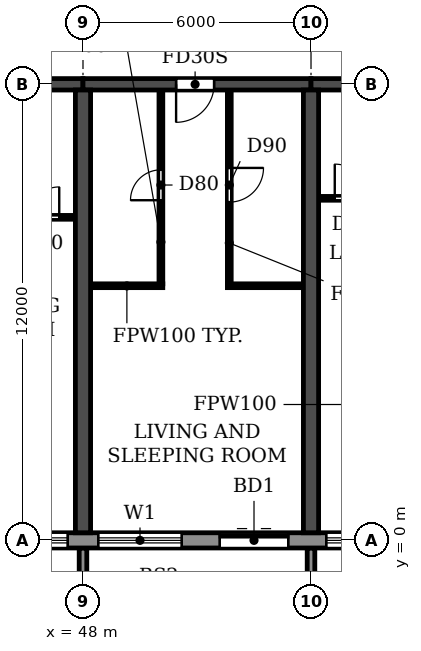
"""IFC4 building model, lengths in metres.
Left out: names, types, materials, properties, quantities, classifications, styles, units other than length and angle.
Written with IfcOpenShell. Run it as: python <this file> out.ifc"""

import sys

from ifc_helpers import new_model, si_unit, direction, frame, frame_2d, origin, place, context, subcontext, project, spatial, polyline, rectangle, outline, extrude, source, transform, mapped, element, fill, save


model = new_model("IFC4")
c1 = context("Model", 3, precision=1e-05, world=origin(), true_north=direction((0.0, 1.0)))
c2 = subcontext(c1, "Body", "Model", "MODEL_VIEW")
j1 = project(units=[si_unit("LENGTHUNIT", "METRE"), si_unit("PLANEANGLEUNIT", "RADIAN")], contexts=[c1])
p1 = place(None, origin())
s1 = spatial("IfcSite", under=j1, at=p1, CompositionType="ELEMENT")
p2 = place(p1, origin())
s2 = spatial("IfcBuilding", under=s1, at=p2, CompositionType="ELEMENT")
p3 = place(p2, frame((0.0, 0.0, 63.0)))
s3 = spatial("IfcBuildingStorey", under=s2, at=p3, CompositionType="ELEMENT", Elevation=63.0)
for number, where, z_axis, x_axis in (
    (1, (48.0, 0.2, 0.0), (0.0, 0.0, 1.0), (0.0, 1.0, 0.0)),
    (2, (54.0, 0.2, 0.0), (0.0, 0.0, 1.0), (0.0, 1.0, 0.0)),
):
    element("IfcWall", number, at=place(p3, frame(where, z_axis=z_axis, x_axis=x_axis)), inside=s3, PredefinedType="SHEAR", context=c2, shape_type="SweptSolid", body=[
        extrude(rectangle(XDim=11.65, YDim=0.4, at=frame_2d((5.825, 0.0))), origin(), (0.0, 0.0, 1.0), 2.95),
    ])
p4 = place(p3, frame((42.0, 12.0, 0.0), z_axis=(0.0, 0.0, 1.0), x_axis=(1.0, 0.0, 0.0)))
e3 = element("IfcWall", 3, at=p4, inside=s3, PredefinedType="SHEAR", context=c2, shape_type="SweptSolid", body=[
    extrude(rectangle(XDim=6.0, YDim=0.3, at=frame_2d((3.0, 0.0))), origin(), (0.0, 0.0, 1.0), 2.35),
])
p5 = place(p4, frame((2.55, 0.0, 0.0)))
e4 = element("IfcOpeningElement", 4, at=p5, cuts=e3, PredefinedType="OPENING", context=c2, shape_type="SweptSolid", body=[
    extrude(rectangle(XDim=1.0, YDim=2.1, at=frame_2d((0.5, 1.05))), frame((0.0, 0.16, 0.0), z_axis=(0.0, -1.0, 0.0), x_axis=(1.0, 0.0, 0.0)), (0.0, 0.0, 1.0), 0.32),
])
p6 = place(p3, frame((48.0, 12.0, 0.0), z_axis=(0.0, 0.0, 1.0), x_axis=(1.0, 0.0, 0.0)))
e5 = element("IfcWall", 5, at=p6, inside=s3, PredefinedType="SHEAR", context=c2, shape_type="SweptSolid", body=[
    extrude(rectangle(XDim=6.0, YDim=0.3, at=frame_2d((3.0, 0.0))), origin(), (0.0, 0.0, 1.0), 2.35),
])
p7 = place(p6, frame((2.45, 0.0, 0.0)))
e6 = element("IfcOpeningElement", 6, at=p7, cuts=e5, PredefinedType="OPENING", context=c2, shape_type="SweptSolid", body=[
    extrude(rectangle(XDim=1.0, YDim=2.1, at=frame_2d((0.5, 1.05))), frame((0.0, 0.16, 0.0), z_axis=(0.0, -1.0, 0.0), x_axis=(1.0, 0.0, 0.0)), (0.0, 0.0, 1.0), 0.32),
])
p8 = place(p3, frame((54.0, 12.0, 0.0), z_axis=(0.0, 0.0, 1.0), x_axis=(1.0, 0.0, 0.0)))
e7 = element("IfcWall", 7, at=p8, inside=s3, PredefinedType="SHEAR", context=c2, shape_type="SweptSolid", body=[
    extrude(rectangle(XDim=6.0, YDim=0.3, at=frame_2d((3.0, 0.0))), origin(), (0.0, 0.0, 1.0), 2.35),
])
p9 = place(p8, frame((2.55, 0.0, 0.0)))
e8 = element("IfcOpeningElement", 8, at=p9, cuts=e7, PredefinedType="OPENING", context=c2, shape_type="SweptSolid", body=[
    extrude(rectangle(XDim=1.0, YDim=2.1, at=frame_2d((0.5, 1.05))), frame((0.0, 0.16, 0.0), z_axis=(0.0, -1.0, 0.0), x_axis=(1.0, 0.0, 0.0)), (0.0, 0.0, 1.0), 0.32),
])
p10 = place(p3, frame((10.683, 0.0, 0.0), z_axis=(0.0, 0.0, 1.0), x_axis=(1.0, 0.0, 0.0)))
e9 = element("IfcWall", 9, at=p10, inside=s3, PredefinedType="STANDARD", context=c2, shape_type="SweptSolid", body=[
    extrude(rectangle(XDim=80.634, YDim=0.4, at=frame_2d((40.317, 0.0))), origin(), (0.0, 0.0, 1.0), 2.95),
])
p11 = place(p10, frame((1.717, 0.0, 0.9)))
e10 = element("IfcOpeningElement", 10, at=p11, cuts=e9, PredefinedType="OPENING", context=c2, shape_type="SweptSolid", body=[
    extrude(rectangle(XDim=2.2, YDim=1.5, at=frame_2d((1.1, 0.75))), frame((0.0, 0.21, 0.0), z_axis=(0.0, -1.0, 0.0), x_axis=(1.0, 0.0, 0.0)), (0.0, 0.0, 1.0), 0.42),
])
p12 = place(p10, frame((4.917, 0.0, 0.0)))
e11 = element("IfcOpeningElement", 11, at=p12, cuts=e9, PredefinedType="OPENING", context=c2, shape_type="SweptSolid", body=[
    extrude(rectangle(XDim=1.8, YDim=2.4, at=frame_2d((0.9, 1.2))), frame((0.0, 0.21, 0.0), z_axis=(0.0, -1.0, 0.0), x_axis=(1.0, 0.0, 0.0)), (0.0, 0.0, 1.0), 0.42),
])
p13 = place(p10, frame((7.717, 0.0, 0.9)))
e12 = element("IfcOpeningElement", 12, at=p13, cuts=e9, PredefinedType="OPENING", context=c2, shape_type="SweptSolid", body=[
    extrude(rectangle(XDim=2.2, YDim=1.5, at=frame_2d((1.1, 0.75))), frame((0.0, 0.21, 0.0), z_axis=(0.0, -1.0, 0.0), x_axis=(1.0, 0.0, 0.0)), (0.0, 0.0, 1.0), 0.42),
])
p14 = place(p10, frame((10.717, 0.0, 0.9)))
e13 = element("IfcOpeningElement", 13, at=p14, cuts=e9, PredefinedType="OPENING", context=c2, shape_type="SweptSolid", body=[
    extrude(rectangle(XDim=2.2, YDim=1.5, at=frame_2d((1.1, 0.75))), frame((0.0, 0.21, 0.0), z_axis=(0.0, -1.0, 0.0), x_axis=(1.0, 0.0, 0.0)), (0.0, 0.0, 1.0), 0.42),
])
p15 = place(p10, frame((13.717, 0.0, 0.9)))
e14 = element("IfcOpeningElement", 14, at=p15, cuts=e9, PredefinedType="OPENING", context=c2, shape_type="SweptSolid", body=[
    extrude(rectangle(XDim=2.2, YDim=1.5, at=frame_2d((1.1, 0.75))), frame((0.0, 0.21, 0.0), z_axis=(0.0, -1.0, 0.0), x_axis=(1.0, 0.0, 0.0)), (0.0, 0.0, 1.0), 0.42),
])
p16 = place(p10, frame((16.917, 0.0, 0.0)))
e15 = element("IfcOpeningElement", 15, at=p16, cuts=e9, PredefinedType="OPENING", context=c2, shape_type="SweptSolid", body=[
    extrude(rectangle(XDim=1.8, YDim=2.4, at=frame_2d((0.9, 1.2))), frame((0.0, 0.21, 0.0), z_axis=(0.0, -1.0, 0.0), x_axis=(1.0, 0.0, 0.0)), (0.0, 0.0, 1.0), 0.42),
])
p17 = place(p10, frame((19.717, 0.0, 0.9)))
e16 = element("IfcOpeningElement", 16, at=p17, cuts=e9, PredefinedType="OPENING", context=c2, shape_type="SweptSolid", body=[
    extrude(rectangle(XDim=2.2, YDim=1.5, at=frame_2d((1.1, 0.75))), frame((0.0, 0.21, 0.0), z_axis=(0.0, -1.0, 0.0), x_axis=(1.0, 0.0, 0.0)), (0.0, 0.0, 1.0), 0.42),
])
p18 = place(p10, frame((22.717, 0.0, 0.9)))
e17 = element("IfcOpeningElement", 17, at=p18, cuts=e9, PredefinedType="OPENING", context=c2, shape_type="SweptSolid", body=[
    extrude(rectangle(XDim=2.2, YDim=1.5, at=frame_2d((1.1, 0.75))), frame((0.0, 0.21, 0.0), z_axis=(0.0, -1.0, 0.0), x_axis=(1.0, 0.0, 0.0)), (0.0, 0.0, 1.0), 0.42),
])
p19 = place(p10, frame((25.917, 0.0, 0.0)))
e18 = element("IfcOpeningElement", 18, at=p19, cuts=e9, PredefinedType="OPENING", context=c2, shape_type="SweptSolid", body=[
    extrude(rectangle(XDim=1.8, YDim=2.4, at=frame_2d((0.9, 1.2))), frame((0.0, 0.21, 0.0), z_axis=(0.0, -1.0, 0.0), x_axis=(1.0, 0.0, 0.0)), (0.0, 0.0, 1.0), 0.42),
])
p20 = place(p10, frame((28.717, 0.0, 0.9)))
e19 = element("IfcOpeningElement", 19, at=p20, cuts=e9, PredefinedType="OPENING", context=c2, shape_type="SweptSolid", body=[
    extrude(rectangle(XDim=2.2, YDim=1.5, at=frame_2d((1.1, 0.75))), frame((0.0, 0.21, 0.0), z_axis=(0.0, -1.0, 0.0), x_axis=(1.0, 0.0, 0.0)), (0.0, 0.0, 1.0), 0.42),
])
p21 = place(p10, frame((31.717, 0.0, 0.9)))
e20 = element("IfcOpeningElement", 20, at=p21, cuts=e9, PredefinedType="OPENING", context=c2, shape_type="SweptSolid", body=[
    extrude(rectangle(XDim=2.2, YDim=1.5, at=frame_2d((1.1, 0.75))), frame((0.0, 0.21, 0.0), z_axis=(0.0, -1.0, 0.0), x_axis=(1.0, 0.0, 0.0)), (0.0, 0.0, 1.0), 0.42),
])
p22 = place(p10, frame((34.717, 0.0, 0.9)))
e21 = element("IfcOpeningElement", 21, at=p22, cuts=e9, PredefinedType="OPENING", context=c2, shape_type="SweptSolid", body=[
    extrude(rectangle(XDim=2.2, YDim=1.5, at=frame_2d((1.1, 0.75))), frame((0.0, 0.21, 0.0), z_axis=(0.0, -1.0, 0.0), x_axis=(1.0, 0.0, 0.0)), (0.0, 0.0, 1.0), 0.42),
])
p23 = place(p10, frame((37.717, 0.0, 0.9)))
e22 = element("IfcOpeningElement", 22, at=p23, cuts=e9, PredefinedType="OPENING", context=c2, shape_type="SweptSolid", body=[
    extrude(rectangle(XDim=2.2, YDim=1.5, at=frame_2d((1.1, 0.75))), frame((0.0, 0.21, 0.0), z_axis=(0.0, -1.0, 0.0), x_axis=(1.0, 0.0, 0.0)), (0.0, 0.0, 1.0), 0.42),
])
p24 = place(p10, frame((40.917, 0.0, 0.0)))
e23 = element("IfcOpeningElement", 23, at=p24, cuts=e9, PredefinedType="OPENING", context=c2, shape_type="SweptSolid", body=[
    extrude(rectangle(XDim=1.8, YDim=2.4, at=frame_2d((0.9, 1.2))), frame((0.0, 0.21, 0.0), z_axis=(0.0, -1.0, 0.0), x_axis=(1.0, 0.0, 0.0)), (0.0, 0.0, 1.0), 0.42),
])
p25 = place(p10, frame((43.717, 0.0, 0.9)))
e24 = element("IfcOpeningElement", 24, at=p25, cuts=e9, PredefinedType="OPENING", context=c2, shape_type="SweptSolid", body=[
    extrude(rectangle(XDim=2.2, YDim=1.5, at=frame_2d((1.1, 0.75))), frame((0.0, 0.21, 0.0), z_axis=(0.0, -1.0, 0.0), x_axis=(1.0, 0.0, 0.0)), (0.0, 0.0, 1.0), 0.42),
])
p26 = place(p10, frame((46.717, 0.0, 0.9)))
e25 = element("IfcOpeningElement", 25, at=p26, cuts=e9, PredefinedType="OPENING", context=c2, shape_type="SweptSolid", body=[
    extrude(rectangle(XDim=2.2, YDim=1.5, at=frame_2d((1.1, 0.75))), frame((0.0, 0.21, 0.0), z_axis=(0.0, -1.0, 0.0), x_axis=(1.0, 0.0, 0.0)), (0.0, 0.0, 1.0), 0.42),
])
p27 = place(p10, frame((49.717, 0.0, 0.9)))
e26 = element("IfcOpeningElement", 26, at=p27, cuts=e9, PredefinedType="OPENING", context=c2, shape_type="SweptSolid", body=[
    extrude(rectangle(XDim=2.2, YDim=1.5, at=frame_2d((1.1, 0.75))), frame((0.0, 0.21, 0.0), z_axis=(0.0, -1.0, 0.0), x_axis=(1.0, 0.0, 0.0)), (0.0, 0.0, 1.0), 0.42),
])
p28 = place(p10, frame((52.717, 0.0, 0.9)))
e27 = element("IfcOpeningElement", 27, at=p28, cuts=e9, PredefinedType="OPENING", context=c2, shape_type="SweptSolid", body=[
    extrude(rectangle(XDim=2.2, YDim=1.5, at=frame_2d((1.1, 0.75))), frame((0.0, 0.21, 0.0), z_axis=(0.0, -1.0, 0.0), x_axis=(1.0, 0.0, 0.0)), (0.0, 0.0, 1.0), 0.42),
])
p29 = place(p10, frame((55.717, 0.0, 0.9)))
e28 = element("IfcOpeningElement", 28, at=p29, cuts=e9, PredefinedType="OPENING", context=c2, shape_type="SweptSolid", body=[
    extrude(rectangle(XDim=2.2, YDim=1.5, at=frame_2d((1.1, 0.75))), frame((0.0, 0.21, 0.0), z_axis=(0.0, -1.0, 0.0), x_axis=(1.0, 0.0, 0.0)), (0.0, 0.0, 1.0), 0.42),
])
p30 = place(p10, frame((58.717, 0.0, 0.9)))
e29 = element("IfcOpeningElement", 29, at=p30, cuts=e9, PredefinedType="OPENING", context=c2, shape_type="SweptSolid", body=[
    extrude(rectangle(XDim=2.2, YDim=1.5, at=frame_2d((1.1, 0.75))), frame((0.0, 0.21, 0.0), z_axis=(0.0, -1.0, 0.0), x_axis=(1.0, 0.0, 0.0)), (0.0, 0.0, 1.0), 0.42),
])
p31 = place(p10, frame((61.717, 0.0, 0.9)))
e30 = element("IfcOpeningElement", 30, at=p31, cuts=e9, PredefinedType="OPENING", context=c2, shape_type="SweptSolid", body=[
    extrude(rectangle(XDim=2.2, YDim=1.5, at=frame_2d((1.1, 0.75))), frame((0.0, 0.21, 0.0), z_axis=(0.0, -1.0, 0.0), x_axis=(1.0, 0.0, 0.0)), (0.0, 0.0, 1.0), 0.42),
])
p32 = place(p10, frame((64.917, 0.0, 0.0)))
e31 = element("IfcOpeningElement", 31, at=p32, cuts=e9, PredefinedType="OPENING", context=c2, shape_type="SweptSolid", body=[
    extrude(rectangle(XDim=1.8, YDim=2.4, at=frame_2d((0.9, 1.2))), frame((0.0, 0.21, 0.0), z_axis=(0.0, -1.0, 0.0), x_axis=(1.0, 0.0, 0.0)), (0.0, 0.0, 1.0), 0.42),
])
p33 = place(p10, frame((67.717, 0.0, 0.9)))
e32 = element("IfcOpeningElement", 32, at=p33, cuts=e9, PredefinedType="OPENING", context=c2, shape_type="SweptSolid", body=[
    extrude(rectangle(XDim=2.2, YDim=1.5, at=frame_2d((1.1, 0.75))), frame((0.0, 0.21, 0.0), z_axis=(0.0, -1.0, 0.0), x_axis=(1.0, 0.0, 0.0)), (0.0, 0.0, 1.0), 0.42),
])
p34 = place(p10, frame((70.717, 0.0, 0.9)))
e33 = element("IfcOpeningElement", 33, at=p34, cuts=e9, PredefinedType="OPENING", context=c2, shape_type="SweptSolid", body=[
    extrude(rectangle(XDim=2.2, YDim=1.5, at=frame_2d((1.1, 0.75))), frame((0.0, 0.21, 0.0), z_axis=(0.0, -1.0, 0.0), x_axis=(1.0, 0.0, 0.0)), (0.0, 0.0, 1.0), 0.42),
])
p35 = place(p10, frame((73.717, 0.0, 0.9)))
e34 = element("IfcOpeningElement", 34, at=p35, cuts=e9, PredefinedType="OPENING", context=c2, shape_type="SweptSolid", body=[
    extrude(rectangle(XDim=2.2, YDim=1.5, at=frame_2d((1.1, 0.75))), frame((0.0, 0.21, 0.0), z_axis=(0.0, -1.0, 0.0), x_axis=(1.0, 0.0, 0.0)), (0.0, 0.0, 1.0), 0.42),
])
p36 = place(p10, frame((76.917, 0.0, 0.0)))
e35 = element("IfcOpeningElement", 35, at=p36, cuts=e9, PredefinedType="OPENING", context=c2, shape_type="SweptSolid", body=[
    extrude(rectangle(XDim=1.8, YDim=2.4, at=frame_2d((0.9, 1.2))), frame((0.0, 0.21, 0.0), z_axis=(0.0, -1.0, 0.0), x_axis=(1.0, 0.0, 0.0)), (0.0, 0.0, 1.0), 0.42),
])
m1 = source(origin(), c2, "Body", "SweptSolid", [
    extrude(outline(polyline([(0.0, 0.0), (0.2, 0.0), (0.2, 1.65), (0.0, 1.65), (0.0, 0.0)])), origin(), (0.0, 0.0, 1.0), 3.1),
])
for number, where in (
    (36, (47.9, -1.85, 0.0)),
    (37, (53.9, -1.85, 0.0)),
):
    element("IfcWall", number, at=place(p3, frame(where)), inside=s3, PredefinedType="STANDARD", context=c2, shape_type="MappedRepresentation", body=[
        mapped(m1, transform((0.0, 0.0, 0.0))),
    ])
p37 = place(p3, frame((48.21, 6.7, 0.0), z_axis=(0.0, 0.0, 1.0), x_axis=(1.0, 0.0, 0.0)))
e38 = element("IfcWall", 38, at=p37, inside=s3, PredefinedType="PARTITIONING", context=c2, shape_type="SweptSolid", body=[
    extrude(rectangle(XDim=1.89, YDim=0.1, at=frame_2d((0.945, 0.0))), origin(), (0.0, 0.0, 1.0), 2.95),
])
p38 = place(p3, frame((51.8, 6.7, 0.0), z_axis=(0.0, 0.0, 1.0), x_axis=(1.0, 0.0, 0.0)))
e39 = element("IfcWall", 39, at=p38, inside=s3, PredefinedType="PARTITIONING", context=c2, shape_type="SweptSolid", body=[
    extrude(rectangle(XDim=1.99, YDim=0.1, at=frame_2d((0.995, 0.0))), origin(), (0.0, 0.0, 1.0), 2.95),
])
p39 = place(p3, frame((45.9, 8.5, 0.0), z_axis=(0.0, 0.0, 1.0), x_axis=(1.0, 0.0, 0.0)))
e40 = element("IfcWall", 40, at=p39, inside=s3, PredefinedType="PARTITIONING", context=c2, shape_type="SweptSolid", body=[
    extrude(rectangle(XDim=1.89, YDim=0.1, at=frame_2d((0.945, 0.0))), origin(), (0.0, 0.0, 1.0), 2.95),
])
p40 = place(p39, frame((0.675, 0.0, 0.0)))
e41 = element("IfcOpeningElement", 41, at=p40, cuts=e40, PredefinedType="OPENING", context=c2, shape_type="SweptSolid", body=[
    extrude(rectangle(XDim=0.8, YDim=2.1, at=frame_2d((0.4, 1.05))), frame((0.0, 0.06, 0.0), z_axis=(0.0, -1.0, 0.0), x_axis=(1.0, 0.0, 0.0)), (0.0, 0.0, 1.0), 0.12),
])
p41 = place(p3, frame((54.21, 9.0, 0.0), z_axis=(0.0, 0.0, 1.0), x_axis=(1.0, 0.0, 0.0)))
e42 = element("IfcWall", 42, at=p41, inside=s3, PredefinedType="PARTITIONING", context=c2, shape_type="SweptSolid", body=[
    extrude(rectangle(XDim=1.99, YDim=0.1, at=frame_2d((0.995, 0.0))), origin(), (0.0, 0.0, 1.0), 2.95),
])
p42 = place(p41, frame((0.415, 0.0, 0.0)))
e43 = element("IfcOpeningElement", 43, at=p42, cuts=e42, PredefinedType="OPENING", context=c2, shape_type="SweptSolid", body=[
    extrude(rectangle(XDim=0.9, YDim=2.1, at=frame_2d((0.45, 1.05))), frame((0.0, 0.06, 0.0), z_axis=(0.0, -1.0, 0.0), x_axis=(1.0, 0.0, 0.0)), (0.0, 0.0, 1.0), 0.12),
])
p43 = place(p3, frame((50.05, 6.75, 0.0), z_axis=(0.0, 0.0, 1.0), x_axis=(0.0, 1.0, 0.0)))
e44 = element("IfcWall", 44, at=p43, inside=s3, PredefinedType="PARTITIONING", context=c2, shape_type="SweptSolid", body=[
    extrude(rectangle(XDim=5.09, YDim=0.1, at=frame_2d((2.545, 0.0))), origin(), (0.0, 0.0, 1.0), 2.95),
])
p44 = place(p43, frame((2.2, 0.0, 0.0)))
e45 = element("IfcOpeningElement", 45, at=p44, cuts=e44, PredefinedType="OPENING", context=c2, shape_type="SweptSolid", body=[
    extrude(rectangle(XDim=0.8, YDim=2.1, at=frame_2d((0.4, 1.05))), frame((0.0, 0.06, 0.0), z_axis=(0.0, -1.0, 0.0), x_axis=(1.0, 0.0, 0.0)), (0.0, 0.0, 1.0), 0.12),
])
p45 = place(p3, frame((51.85, 6.75, 0.0), z_axis=(0.0, 0.0, 1.0), x_axis=(0.0, 1.0, 0.0)))
e46 = element("IfcWall", 46, at=p45, inside=s3, PredefinedType="PARTITIONING", context=c2, shape_type="SweptSolid", body=[
    extrude(rectangle(XDim=5.09, YDim=0.1, at=frame_2d((2.545, 0.0))), origin(), (0.0, 0.0, 1.0), 2.95),
])
p46 = place(p45, frame((2.15, 0.0, 0.0)))
e47 = element("IfcOpeningElement", 47, at=p46, cuts=e46, PredefinedType="OPENING", context=c2, shape_type="SweptSolid", body=[
    extrude(rectangle(XDim=0.9, YDim=2.1, at=frame_2d((0.45, 1.05))), frame((0.0, 0.06, 0.0), z_axis=(0.0, -1.0, 0.0), x_axis=(1.0, 0.0, 0.0)), (0.0, 0.0, 1.0), 0.12),
])
p47 = place(p22, origin())
e48 = element("IfcWindow", 48, at=p47, inside=s3, PartitioningType="DOUBLE_PANEL_HORIZONTAL", PredefinedType="WINDOW", context=c2, shape_type="SweptSolid", body=[
    extrude(rectangle(XDim=2.2, YDim=1.5, at=frame_2d((1.1, 0.75))), frame((0.0, 0.03, 0.0), z_axis=(0.0, -1.0, 0.0), x_axis=(1.0, 0.0, 0.0)), (0.0, 0.0, 1.0), 0.06),
])
fill(e21, e48)
p48 = place(p23, origin())
e49 = element("IfcWindow", 49, at=p48, inside=s3, PartitioningType="DOUBLE_PANEL_HORIZONTAL", PredefinedType="WINDOW", context=c2, shape_type="SweptSolid", body=[
    extrude(rectangle(XDim=2.2, YDim=1.5, at=frame_2d((1.1, 0.75))), frame((0.0, 0.03, 0.0), z_axis=(0.0, -1.0, 0.0), x_axis=(1.0, 0.0, 0.0)), (0.0, 0.0, 1.0), 0.06),
])
fill(e22, e49)
p49 = place(p24, origin())
e50 = element("IfcDoor", 50, at=p49, inside=s3, OperationType="DOUBLE_DOOR_SLIDING", PredefinedType="DOOR", context=c2, shape_type="SweptSolid", body=[
    extrude(rectangle(XDim=1.8, YDim=2.4, at=frame_2d((0.9, 1.2))), frame((0.0, 0.025, 0.0), z_axis=(0.0, -1.0, 0.0), x_axis=(1.0, 0.0, 0.0)), (0.0, 0.0, 1.0), 0.05),
])
fill(e23, e50)
p50 = place(p25, origin())
e51 = element("IfcWindow", 51, at=p50, inside=s3, PartitioningType="DOUBLE_PANEL_HORIZONTAL", PredefinedType="WINDOW", context=c2, shape_type="SweptSolid", body=[
    extrude(rectangle(XDim=2.2, YDim=1.5, at=frame_2d((1.1, 0.75))), frame((0.0, 0.03, 0.0), z_axis=(0.0, -1.0, 0.0), x_axis=(1.0, 0.0, 0.0)), (0.0, 0.0, 1.0), 0.06),
])
fill(e24, e51)
p51 = place(p40, origin())
e52 = element("IfcDoor", 52, at=p51, inside=s3, OperationType="SINGLE_SWING_RIGHT", PredefinedType="DOOR", context=c2, shape_type="SweptSolid", body=[
    extrude(rectangle(XDim=0.8, YDim=2.1, at=frame_2d((0.4, 1.05))), frame((0.0, 0.025, 0.0), z_axis=(0.0, -1.0, 0.0), x_axis=(1.0, 0.0, 0.0)), (0.0, 0.0, 1.0), 0.05),
])
fill(e41, e52)
p52 = place(p44, origin())
e53 = element("IfcDoor", 53, at=p52, inside=s3, OperationType="SINGLE_SWING_LEFT", PredefinedType="DOOR", context=c2, shape_type="SweptSolid", body=[
    extrude(rectangle(XDim=0.8, YDim=2.1, at=frame_2d((0.4, 1.05))), frame((0.0, 0.025, 0.0), z_axis=(0.0, -1.0, 0.0), x_axis=(1.0, 0.0, 0.0)), (0.0, 0.0, 1.0), 0.05),
])
fill(e45, e53)
p53 = place(p7, frame((1.0, 0.0, 0.0), z_axis=(0.0, 0.0, 1.0), x_axis=(-1.0, 0.0, 0.0)))
e54 = element("IfcDoor", 54, at=p53, inside=s3, OperationType="SINGLE_SWING_RIGHT", PredefinedType="DOOR", context=c2, shape_type="SweptSolid", body=[
    extrude(rectangle(XDim=1.0, YDim=2.1, at=frame_2d((0.5, 1.05))), frame((0.0, 0.025, 0.0), z_axis=(0.0, -1.0, 0.0), x_axis=(1.0, 0.0, 0.0)), (0.0, 0.0, 1.0), 0.05),
])
fill(e6, e54)
p54 = place(p46, frame((0.9, 0.0, 0.0), z_axis=(0.0, 0.0, 1.0), x_axis=(-1.0, 0.0, 0.0)))
e55 = element("IfcDoor", 55, at=p54, inside=s3, OperationType="SINGLE_SWING_LEFT", PredefinedType="DOOR", context=c2, shape_type="SweptSolid", body=[
    extrude(rectangle(XDim=0.9, YDim=2.1, at=frame_2d((0.45, 1.05))), frame((0.0, 0.025, 0.0), z_axis=(0.0, -1.0, 0.0), x_axis=(1.0, 0.0, 0.0)), (0.0, 0.0, 1.0), 0.05),
])
fill(e47, e55)
p55 = place(p42, origin())
e56 = element("IfcDoor", 56, at=p55, inside=s3, OperationType="SINGLE_SWING_LEFT", PredefinedType="DOOR", context=c2, shape_type="SweptSolid", body=[
    extrude(rectangle(XDim=0.9, YDim=2.1, at=frame_2d((0.45, 1.05))), frame((0.0, 0.025, 0.0), z_axis=(0.0, -1.0, 0.0), x_axis=(1.0, 0.0, 0.0)), (0.0, 0.0, 1.0), 0.05),
])
fill(e43, e56)
save(model, sys.argv[1])
